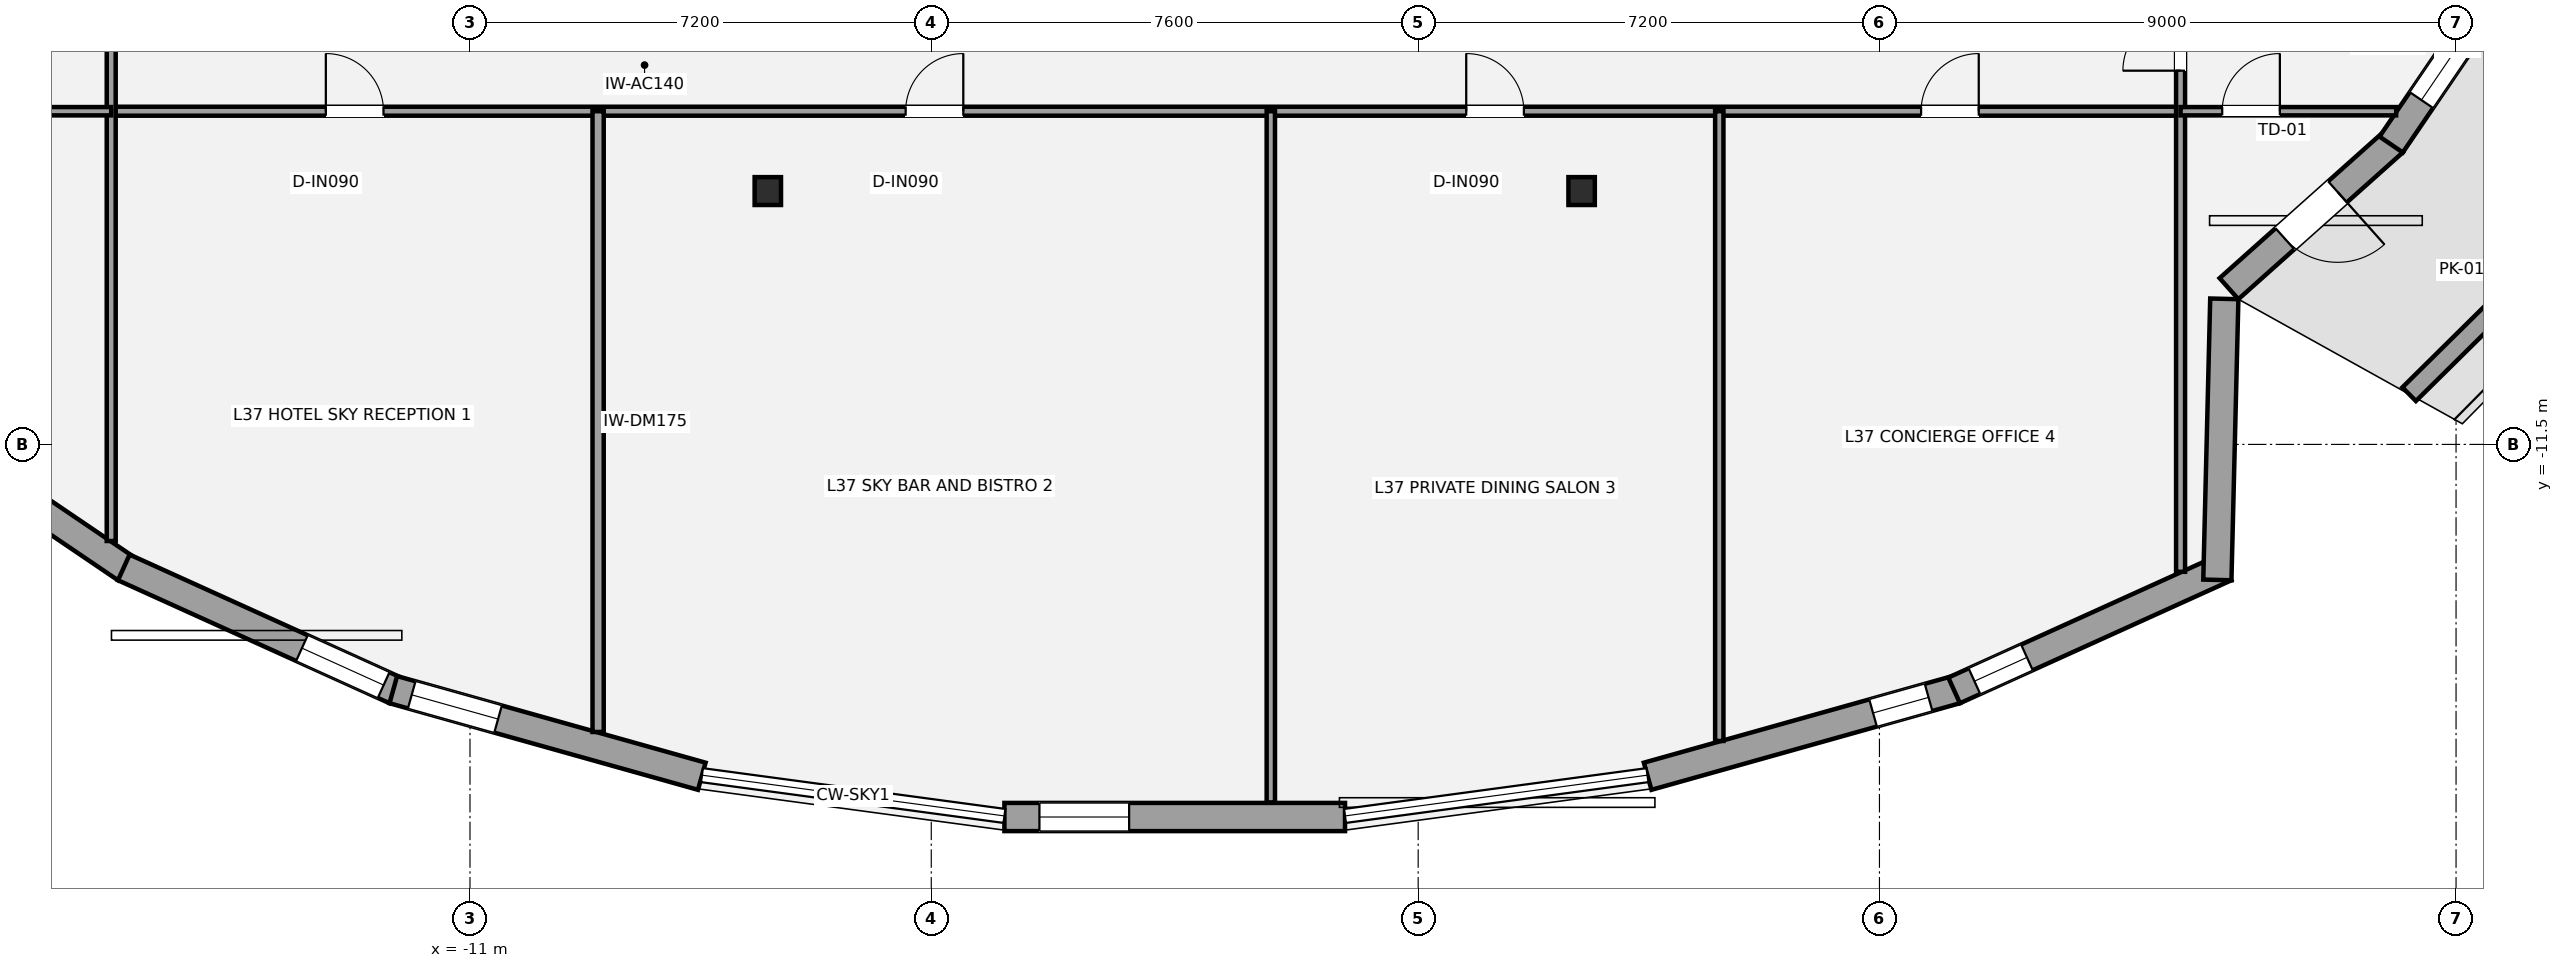
"""IFC4 building model, lengths in metres.
Left out: names, types, materials, properties, quantities, classifications, styles, units other than length and angle.
Written with IfcOpenShell. Run it as: python <this file> out.ifc"""

import sys

from ifc_helpers import new_model, si_unit, direction, frame, frame_2d, origin, origin_2d, place, context, subcontext, project, spatial, rectangle, i_section, extrude, element, fill, save


model = new_model("IFC4")
c1 = context("Model", 3, precision=1e-05, world=origin(), true_north=direction((0.0, 1.0)))
c2 = subcontext(c1, "Body", "Model", "MODEL_VIEW")
j1 = project(units=[si_unit("LENGTHUNIT", "METRE"), si_unit("PLANEANGLEUNIT", "RADIAN")], contexts=[c1])
p1 = place(None, origin())
s1 = spatial("IfcSite", under=j1, at=p1, CompositionType="ELEMENT")
p2 = place(p1, origin())
s2 = spatial("IfcBuilding", under=s1, at=p2, CompositionType="ELEMENT")
p3 = place(p2, frame((0.0, 0.0, 139.6)))
s3 = spatial("IfcBuildingStorey", under=s2, at=p3, CompositionType="ELEMENT", Elevation=139.6)
for number, where, z_axis, x_axis in (
    (1, (-6.351, -7.546, 0.0), (0.0, 0.0, 1.0), (1.0, 0.0, 0.0)),
    (2, (6.351, -7.546, 0.0), (0.0, 0.0, 1.0), (1.0, 0.0, 0.0)),
):
    element("IfcColumn", number, at=place(p3, frame(where, z_axis=z_axis, x_axis=x_axis)), inside=s3, PredefinedType="COLUMN", context=c2, shape_type="SweptSolid", body=[
        extrude(i_section(OverallWidth=0.412, OverallDepth=0.435, WebThickness=0.036, FlangeThickness=0.057, at=origin_2d()), origin(), (0.0, 0.0, 1.0), 4.2),
    ])
p4 = place(p3, frame((-16.371, -13.438, 0.0), z_axis=(0.0, 0.0, 1.0), x_axis=(-0.827816201219, 0.56099940909, 0.0)))
e3 = element("IfcWall", 3, at=p4, inside=s3, PredefinedType="STANDARD", context=c2, shape_type="SweptSolid", body=[
    extrude(rectangle(XDim=4.354, YDim=0.44, at=frame_2d((2.177, 0.0))), origin(), (0.0, 0.0, 1.0), 3.242),
])
p5 = place(p4, frame((2.958, 0.0, 0.58)))
e4 = element("IfcOpeningElement", 4, at=p5, cuts=e3, PredefinedType="OPENING", context=c2, shape_type="SweptSolid", body=[
    extrude(rectangle(XDim=0.9, YDim=1.35, at=frame_2d((0.45, 0.675))), frame((0.0, 0.23, 0.0), z_axis=(0.0, -1.0, 0.0), x_axis=(1.0, 0.0, 0.0)), (0.0, 0.0, 1.0), 0.46),
])
p6 = place(p3, frame((-12.166, -15.339, 0.0), z_axis=(0.0, 0.0, 1.0), x_axis=(-0.910938924115, 0.412541242221, 0.0)))
e5 = element("IfcWall", 5, at=p6, inside=s3, PredefinedType="STANDARD", context=c2, shape_type="SweptSolid", body=[
    extrude(rectangle(XDim=4.652, YDim=0.44, at=frame_2d((2.326, 0.0))), origin(), (0.0, 0.0, 1.0), 3.238),
])
p7 = place(p6, frame((0.2, 0.0, 0.58)))
e6 = element("IfcOpeningElement", 6, at=p7, cuts=e5, PredefinedType="OPENING", context=c2, shape_type="SweptSolid", body=[
    extrude(rectangle(XDim=1.4, YDim=1.55, at=frame_2d((0.7, 0.775))), frame((0.0, 0.23, 0.0), z_axis=(0.0, -1.0, 0.0), x_axis=(1.0, 0.0, 0.0)), (0.0, 0.0, 1.0), 0.46),
])
p8 = place(p3, frame((-7.382, -16.679, 0.0), z_axis=(0.0, 0.0, 1.0), x_axis=(-0.962784823987, 0.270269093129, 0.0)))
e7 = element("IfcWall", 7, at=p8, inside=s3, PredefinedType="STANDARD", context=c2, shape_type="SweptSolid", body=[
    extrude(rectangle(XDim=5.001, YDim=0.44, at=frame_2d((2.5, 0.0))), origin(), (0.0, 0.0, 1.0), 3.238),
])
p9 = place(p8, frame((3.302, 0.0, 0.58)))
e8 = element("IfcOpeningElement", 8, at=p9, cuts=e7, PredefinedType="OPENING", context=c2, shape_type="SweptSolid", body=[
    extrude(rectangle(XDim=1.4, YDim=1.55, at=frame_2d((0.7, 0.775))), frame((0.0, 0.23, 0.0), z_axis=(0.0, -1.0, 0.0), x_axis=(1.0, 0.0, 0.0)), (0.0, 0.0, 1.0), 0.46),
])
p10 = place(p3, frame((2.658, -17.315, 0.0), z_axis=(0.0, 0.0, 1.0), x_axis=(-1.0, 0.0, 0.0)))
e9 = element("IfcWall", 9, at=p10, inside=s3, PredefinedType="STANDARD", context=c2, shape_type="SweptSolid", body=[
    extrude(rectangle(XDim=5.317, YDim=0.44, at=frame_2d((2.658, 0.0))), origin(), (0.0, 0.0, 1.0), 3.242),
])
p11 = place(p10, frame((3.37, 0.0, 0.58)))
e10 = element("IfcOpeningElement", 10, at=p11, cuts=e9, PredefinedType="OPENING", context=c2, shape_type="SweptSolid", body=[
    extrude(rectangle(XDim=1.4, YDim=1.55, at=frame_2d((0.7, 0.775))), frame((0.0, 0.23, 0.0), z_axis=(0.0, -1.0, 0.0), x_axis=(1.0, 0.0, 0.0)), (0.0, 0.0, 1.0), 0.46),
])
p12 = place(p3, frame((12.197, -15.328, 0.0), z_axis=(0.0, 0.0, 1.0), x_axis=(-0.962784823987, -0.270269093129, 0.0)))
e11 = element("IfcWall", 11, at=p12, inside=s3, PredefinedType="STANDARD", context=c2, shape_type="SweptSolid", body=[
    extrude(rectangle(XDim=5.001, YDim=0.44, at=frame_2d((2.5, 0.0))), origin(), (0.0, 0.0, 1.0), 3.238),
])
p13 = place(p12, frame((0.447, 0.0, 0.58)))
e12 = element("IfcOpeningElement", 12, at=p13, cuts=e11, PredefinedType="OPENING", context=c2, shape_type="SweptSolid", body=[
    extrude(rectangle(XDim=0.9, YDim=1.35, at=frame_2d((0.45, 0.675))), frame((0.0, 0.23, 0.0), z_axis=(0.0, -1.0, 0.0), x_axis=(1.0, 0.0, 0.0)), (0.0, 0.0, 1.0), 0.46),
])
p14 = place(p3, frame((16.403, -13.42, 0.0), z_axis=(0.0, 0.0, 1.0), x_axis=(-0.910938924115, -0.412541242221, 0.0)))
e13 = element("IfcWall", 13, at=p14, inside=s3, PredefinedType="STANDARD", context=c2, shape_type="SweptSolid", body=[
    extrude(rectangle(XDim=4.652, YDim=0.44, at=frame_2d((2.326, 0.0))), origin(), (0.0, 0.0, 1.0), 3.238),
])
p15 = place(p14, frame((3.404, 0.0, 0.58)))
e14 = element("IfcOpeningElement", 14, at=p15, cuts=e13, PredefinedType="OPENING", context=c2, shape_type="SweptSolid", body=[
    extrude(rectangle(XDim=0.9, YDim=1.35, at=frame_2d((0.45, 0.675))), frame((0.0, 0.23, 0.0), z_axis=(0.0, -1.0, 0.0), x_axis=(1.0, 0.0, 0.0)), (0.0, 0.0, 1.0), 0.46),
])
p16 = place(p3, frame((16.383, -9.229, 0.0), z_axis=(0.0, 0.0, 1.0), x_axis=(-0.02470442983, -0.999694799, 0.0)))
e15 = element("IfcWall", 15, at=p16, inside=s3, PredefinedType="STANDARD", context=c2, shape_type="SweptSolid", body=[
    extrude(rectangle(XDim=4.388, YDim=0.44, at=frame_2d((2.194, 0.0))), origin(), (0.0, 0.0, 1.0), 3.242),
])
p17 = place(p3, frame((19.023, -6.78, 0.0), z_axis=(0.0, 0.0, 1.0), x_axis=(-0.746170592537, -0.665754794825, 0.0)))
e16 = element("IfcWall", 16, at=p17, inside=s3, PredefinedType="STANDARD", context=c2, shape_type="SweptSolid", body=[
    extrude(rectangle(XDim=3.44, YDim=0.44, at=frame_2d((1.72, 0.0))), origin(), (0.0, 0.0, 1.0), 3.242),
])
p18 = place(p17, frame((1.17, 0.0, 0.0)))
e17 = element("IfcOpeningElement", 17, at=p18, cuts=e16, PredefinedType="OPENING", context=c2, shape_type="SweptSolid", body=[
    extrude(rectangle(XDim=1.1, YDim=2.15, at=frame_2d((0.55, 1.075))), frame((0.0, 0.23, 0.0), z_axis=(0.0, -1.0, 0.0), x_axis=(1.0, 0.0, 0.0)), (0.0, 0.0, 1.0), 0.46),
])
p19 = place(p3, frame((20.781, -4.186, 0.0), z_axis=(0.0, 0.0, 1.0), x_axis=(-0.562718580525, -0.826648534222, 0.0)))
e18 = element("IfcWall", 18, at=p19, inside=s3, PredefinedType="STANDARD", context=c2, shape_type="SweptSolid", body=[
    extrude(rectangle(XDim=3.187, YDim=0.44, at=frame_2d((1.593, 0.0))), origin(), (0.0, 0.0, 1.0), 3.242),
])
p20 = place(p19, frame((0.347, 0.0, 0.6)))
e19 = element("IfcOpeningElement", 19, at=p20, cuts=e18, PredefinedType="OPENING", context=c2, shape_type="SweptSolid", body=[
    extrude(rectangle(XDim=2.0, YDim=2.1, at=frame_2d((1.0, 1.05))), frame((0.0, 0.23, 0.0), z_axis=(0.0, -1.0, 0.0), x_axis=(1.0, 0.0, 0.0)), (0.0, 0.0, 1.0), 0.46),
])
p21 = place(p3, frame((19.268, -10.716, 0.0), z_axis=(0.0, 0.0, 1.0), x_axis=(0.711578739804, 0.702606359962, 0.0)))
e20 = element("IfcWall", 20, at=p21, inside=s3, PredefinedType="PARAPET", context=c2, shape_type="SweptSolid", body=[
    extrude(rectangle(XDim=3.891, YDim=0.3, at=frame_2d((1.946, 0.0))), origin(), (0.0, 0.0, 1.0), 0.45),
])
p22 = place(p3, frame((-16.6, -6.3, 0.0), z_axis=(0.0, 0.0, 1.0), x_axis=(1.0, 0.0, 0.0)))
e21 = element("IfcWall", 21, at=p22, inside=s3, PredefinedType="PARTITIONING", context=c2, shape_type="SweptSolid", body=[
    extrude(rectangle(XDim=32.3, YDim=0.14, at=frame_2d((16.15, 0.0))), origin(), (0.0, 0.0, 1.0), 3.398),
])
p23 = place(p22, frame((3.35, 0.0, 0.0)))
e22 = element("IfcOpeningElement", 22, at=p23, cuts=e21, PredefinedType="OPENING", context=c2, shape_type="SweptSolid", body=[
    extrude(rectangle(XDim=0.9, YDim=2.1, at=frame_2d((0.45, 1.05))), frame((0.0, 0.08, 0.0), z_axis=(0.0, -1.0, 0.0), x_axis=(1.0, 0.0, 0.0)), (0.0, 0.0, 1.0), 0.16),
])
p24 = place(p22, frame((12.4, 0.0, 0.0)))
e23 = element("IfcOpeningElement", 23, at=p24, cuts=e21, PredefinedType="OPENING", context=c2, shape_type="SweptSolid", body=[
    extrude(rectangle(XDim=0.9, YDim=2.1, at=frame_2d((0.45, 1.05))), frame((0.0, 0.08, 0.0), z_axis=(0.0, -1.0, 0.0), x_axis=(1.0, 0.0, 0.0)), (0.0, 0.0, 1.0), 0.16),
])
p25 = place(p22, frame((21.15, 0.0, 0.0)))
e24 = element("IfcOpeningElement", 24, at=p25, cuts=e21, PredefinedType="OPENING", context=c2, shape_type="SweptSolid", body=[
    extrude(rectangle(XDim=0.9, YDim=2.1, at=frame_2d((0.45, 1.05))), frame((0.0, 0.08, 0.0), z_axis=(0.0, -1.0, 0.0), x_axis=(1.0, 0.0, 0.0)), (0.0, 0.0, 1.0), 0.16),
])
p26 = place(p22, frame((28.25, 0.0, 0.0)))
e25 = element("IfcOpeningElement", 25, at=p26, cuts=e21, PredefinedType="OPENING", context=c2, shape_type="SweptSolid", body=[
    extrude(rectangle(XDim=0.9, YDim=2.1, at=frame_2d((0.45, 1.05))), frame((0.0, 0.08, 0.0), z_axis=(0.0, -1.0, 0.0), x_axis=(1.0, 0.0, 0.0)), (0.0, 0.0, 1.0), 0.16),
])
p27 = place(p3, frame((-16.6, -13.008, 0.0), z_axis=(0.0, 0.0, 1.0), x_axis=(0.0, 1.0, 0.0)))
e26 = element("IfcWall", 26, at=p27, inside=s3, PredefinedType="PARTITIONING", context=c2, shape_type="SweptSolid", body=[
    extrude(rectangle(XDim=20.558, YDim=0.14, at=frame_2d((10.279, 0.0))), origin(), (0.0, 0.0, 1.0), 3.398),
])
p28 = place(p27, frame((10.508, 0.0, 0.0)))
e27 = element("IfcOpeningElement", 27, at=p28, cuts=e26, PredefinedType="OPENING", context=c2, shape_type="SweptSolid", body=[
    extrude(rectangle(XDim=0.9, YDim=2.1, at=frame_2d((0.45, 1.05))), frame((0.0, 0.08, 0.0), z_axis=(0.0, -1.0, 0.0), x_axis=(1.0, 0.0, 0.0)), (0.0, 0.0, 1.0), 0.16),
])
p29 = place(p27, frame((17.433, 0.0, 0.0)))
e28 = element("IfcOpeningElement", 28, at=p29, cuts=e26, PredefinedType="OPENING", context=c2, shape_type="SweptSolid", body=[
    extrude(rectangle(XDim=0.9, YDim=2.1, at=frame_2d((0.45, 1.05))), frame((0.0, 0.08, 0.0), z_axis=(0.0, -1.0, 0.0), x_axis=(1.0, 0.0, 0.0)), (0.0, 0.0, 1.0), 0.16),
])
p30 = place(p3, frame((15.7, -13.488, 0.0), z_axis=(0.0, 0.0, 1.0), x_axis=(0.0, 1.0, 0.0)))
e29 = element("IfcWall", 29, at=p30, inside=s3, PredefinedType="PARTITIONING", context=c2, shape_type="SweptSolid", body=[
    extrude(rectangle(XDim=21.038, YDim=0.14, at=frame_2d((10.519, 0.0))), origin(), (0.0, 0.0, 1.0), 3.473),
])
p31 = place(p30, frame((7.821, 0.0, 0.0)))
e30 = element("IfcOpeningElement", 30, at=p31, cuts=e29, PredefinedType="OPENING", context=c2, shape_type="SweptSolid", body=[
    extrude(rectangle(XDim=0.9, YDim=2.1, at=frame_2d((0.45, 1.05))), frame((0.0, 0.08, 0.0), z_axis=(0.0, -1.0, 0.0), x_axis=(1.0, 0.0, 0.0)), (0.0, 0.0, 1.0), 0.16),
])
p32 = place(p30, frame((10.153, 0.0, 0.0)))
e31 = element("IfcOpeningElement", 31, at=p32, cuts=e29, PredefinedType="OPENING", context=c2, shape_type="SweptSolid", body=[
    extrude(rectangle(XDim=0.9, YDim=2.1, at=frame_2d((0.45, 1.05))), frame((0.0, 0.08, 0.0), z_axis=(0.0, -1.0, 0.0), x_axis=(1.0, 0.0, 0.0)), (0.0, 0.0, 1.0), 0.16),
])
p33 = place(p30, frame((13.921, 0.0, 0.0)))
e32 = element("IfcOpeningElement", 32, at=p33, cuts=e29, PredefinedType="OPENING", context=c2, shape_type="SweptSolid", body=[
    extrude(rectangle(XDim=0.9, YDim=2.1, at=frame_2d((0.45, 1.05))), frame((0.0, 0.08, 0.0), z_axis=(0.0, -1.0, 0.0), x_axis=(1.0, 0.0, 0.0)), (0.0, 0.0, 1.0), 0.16),
])
p34 = place(p30, frame((18.513, 0.0, 0.0)))
e33 = element("IfcOpeningElement", 33, at=p34, cuts=e29, PredefinedType="OPENING", context=c2, shape_type="SweptSolid", body=[
    extrude(rectangle(XDim=0.9, YDim=2.1, at=frame_2d((0.45, 1.05))), frame((0.0, 0.08, 0.0), z_axis=(0.0, -1.0, 0.0), x_axis=(1.0, 0.0, 0.0)), (0.0, 0.0, 1.0), 0.16),
])
p35 = place(p3, frame((-9.0, -15.988, 0.0), z_axis=(0.0, 0.0, 1.0), x_axis=(0.0, 1.0, 0.0)))
e34 = element("IfcWall", 34, at=p35, inside=s3, PredefinedType="PARTITIONING", context=c2, shape_type="SweptSolid", body=[
    extrude(rectangle(XDim=9.688, YDim=0.175, at=frame_2d((4.844, 0.0))), origin(), (0.0, 0.0, 1.0), 4.02),
])
p36 = place(p3, frame((1.5, -17.087, 0.0), z_axis=(0.0, 0.0, 1.0), x_axis=(0.0, 1.0, 0.0)))
e35 = element("IfcWall", 35, at=p36, inside=s3, PredefinedType="PARTITIONING", context=c2, shape_type="SweptSolid", body=[
    extrude(rectangle(XDim=10.787, YDim=0.13, at=frame_2d((5.394, 0.0))), origin(), (0.0, 0.0, 1.0), 3.473),
])
p37 = place(p3, frame((8.5, -16.129, 0.0), z_axis=(0.0, 0.0, 1.0), x_axis=(0.0, 1.0, 0.0)))
e36 = element("IfcWall", 36, at=p37, inside=s3, PredefinedType="PARTITIONING", context=c2, shape_type="SweptSolid", body=[
    extrude(rectangle(XDim=9.829, YDim=0.13, at=frame_2d((4.914, 0.0))), origin(), (0.0, 0.0, 1.0), 4.02),
])
p38 = place(p3, frame((-23.631, -6.3, 0.0), z_axis=(0.0, 0.0, 1.0), x_axis=(1.0, 0.0, 0.0)))
e37 = element("IfcWall", 37, at=p38, inside=s3, PredefinedType="PARTITIONING", context=c2, shape_type="SweptSolid", body=[
    extrude(rectangle(XDim=7.031, YDim=0.13, at=frame_2d((3.516, 0.0))), origin(), (0.0, 0.0, 1.0), 3.473),
])
p39 = place(p38, frame((1.23, 0.0, 0.0)))
e38 = element("IfcOpeningElement", 38, at=p39, cuts=e37, PredefinedType="OPENING", context=c2, shape_type="SweptSolid", body=[
    extrude(rectangle(XDim=0.9, YDim=2.1, at=frame_2d((0.45, 1.05))), frame((0.0, 0.075, 0.0), z_axis=(0.0, -1.0, 0.0), x_axis=(1.0, 0.0, 0.0)), (0.0, 0.0, 1.0), 0.15),
])
p40 = place(p3, frame((15.7, -6.3, 0.0), z_axis=(0.0, 0.0, 1.0), x_axis=(1.0, 0.0, 0.0)))
e39 = element("IfcWall", 39, at=p40, inside=s3, PredefinedType="PARTITIONING", context=c2, shape_type="SweptSolid", body=[
    extrude(rectangle(XDim=3.365, YDim=0.13, at=frame_2d((1.683, 0.0))), origin(), (0.0, 0.0, 1.0), 4.02),
])
p41 = place(p40, frame((0.65, 0.0, 0.0)))
e40 = element("IfcOpeningElement", 40, at=p41, cuts=e39, PredefinedType="OPENING", context=c2, shape_type="SweptSolid", body=[
    extrude(rectangle(XDim=0.9, YDim=2.1, at=frame_2d((0.45, 1.05))), frame((0.0, 0.075, 0.0), z_axis=(0.0, -1.0, 0.0), x_axis=(1.0, 0.0, 0.0)), (0.0, 0.0, 1.0), 0.15),
])
p42 = place(p7, origin())
e41 = element("IfcWindow", 41, at=p42, inside=s3, PartitioningType="SINGLE_PANEL", PredefinedType="WINDOW", context=c2, shape_type="SweptSolid", body=[
    extrude(rectangle(XDim=1.4, YDim=1.55, at=frame_2d((0.7, 0.775))), frame((0.0, -0.01, 0.0), z_axis=(0.0, -1.0, 0.0), x_axis=(1.0, 0.0, 0.0)), (0.0, 0.0, 1.0), 0.06),
])
fill(e6, e41)
p43 = place(p9, origin())
e42 = element("IfcWindow", 42, at=p43, inside=s3, PartitioningType="SINGLE_PANEL", PredefinedType="WINDOW", context=c2, shape_type="SweptSolid", body=[
    extrude(rectangle(XDim=1.4, YDim=1.55, at=frame_2d((0.7, 0.775))), frame((0.0, -0.01, 0.0), z_axis=(0.0, -1.0, 0.0), x_axis=(1.0, 0.0, 0.0)), (0.0, 0.0, 1.0), 0.06),
])
fill(e8, e42)
p44 = place(p11, origin())
e43 = element("IfcWindow", 43, at=p44, inside=s3, PartitioningType="SINGLE_PANEL", PredefinedType="WINDOW", context=c2, shape_type="SweptSolid", body=[
    extrude(rectangle(XDim=1.4, YDim=1.55, at=frame_2d((0.7, 0.775))), frame((0.0, -0.01, 0.0), z_axis=(0.0, -1.0, 0.0), x_axis=(1.0, 0.0, 0.0)), (0.0, 0.0, 1.0), 0.06),
])
fill(e10, e43)
p45 = place(p13, origin())
e44 = element("IfcWindow", 44, at=p45, inside=s3, PartitioningType="SINGLE_PANEL", PredefinedType="WINDOW", context=c2, shape_type="SweptSolid", body=[
    extrude(rectangle(XDim=0.9, YDim=1.35, at=frame_2d((0.45, 0.675))), frame((0.0, -0.01, 0.0), z_axis=(0.0, -1.0, 0.0), x_axis=(1.0, 0.0, 0.0)), (0.0, 0.0, 1.0), 0.06),
])
fill(e12, e44)
p46 = place(p15, origin())
e45 = element("IfcWindow", 45, at=p46, inside=s3, PartitioningType="SINGLE_PANEL", PredefinedType="WINDOW", context=c2, shape_type="SweptSolid", body=[
    extrude(rectangle(XDim=0.9, YDim=1.35, at=frame_2d((0.45, 0.675))), frame((0.0, -0.01, 0.0), z_axis=(0.0, -1.0, 0.0), x_axis=(1.0, 0.0, 0.0)), (0.0, 0.0, 1.0), 0.06),
])
fill(e14, e45)
p47 = place(p18, origin())
e46 = element("IfcDoor", 46, at=p47, inside=s3, OperationType="SINGLE_SWING_LEFT", PredefinedType="DOOR", context=c2, shape_type="SweptSolid", body=[
    extrude(rectangle(XDim=1.1, YDim=2.15, at=frame_2d((0.55, 1.075))), frame((0.0, 0.025, 0.0), z_axis=(0.0, -1.0, 0.0), x_axis=(1.0, 0.0, 0.0)), (0.0, 0.0, 1.0), 0.05),
])
fill(e17, e46)
p48 = place(p20, origin())
e47 = element("IfcWindow", 47, at=p48, inside=s3, PartitioningType="SINGLE_PANEL", PredefinedType="WINDOW", context=c2, shape_type="SweptSolid", body=[
    extrude(rectangle(XDim=2.0, YDim=2.1, at=frame_2d((1.0, 1.05))), frame((0.0, -0.01, 0.0), z_axis=(0.0, -1.0, 0.0), x_axis=(1.0, 0.0, 0.0)), (0.0, 0.0, 1.0), 0.06),
])
fill(e19, e47)
p49 = place(p23, origin())
e48 = element("IfcDoor", 48, at=p49, inside=s3, OperationType="SINGLE_SWING_LEFT", PredefinedType="DOOR", context=c2, shape_type="SweptSolid", body=[
    extrude(rectangle(XDim=0.9, YDim=2.1, at=frame_2d((0.45, 1.05))), frame((0.0, 0.025, 0.0), z_axis=(0.0, -1.0, 0.0), x_axis=(1.0, 0.0, 0.0)), (0.0, 0.0, 1.0), 0.05),
])
fill(e22, e48)
p50 = place(p24, origin())
e49 = element("IfcDoor", 49, at=p50, inside=s3, OperationType="SINGLE_SWING_RIGHT", PredefinedType="DOOR", context=c2, shape_type="SweptSolid", body=[
    extrude(rectangle(XDim=0.9, YDim=2.1, at=frame_2d((0.45, 1.05))), frame((0.0, 0.025, 0.0), z_axis=(0.0, -1.0, 0.0), x_axis=(1.0, 0.0, 0.0)), (0.0, 0.0, 1.0), 0.05),
])
fill(e23, e49)
p51 = place(p25, origin())
e50 = element("IfcDoor", 50, at=p51, inside=s3, OperationType="SINGLE_SWING_LEFT", PredefinedType="DOOR", context=c2, shape_type="SweptSolid", body=[
    extrude(rectangle(XDim=0.9, YDim=2.1, at=frame_2d((0.45, 1.05))), frame((0.0, 0.025, 0.0), z_axis=(0.0, -1.0, 0.0), x_axis=(1.0, 0.0, 0.0)), (0.0, 0.0, 1.0), 0.05),
])
fill(e24, e50)
p52 = place(p26, origin())
e51 = element("IfcDoor", 51, at=p52, inside=s3, OperationType="SINGLE_SWING_RIGHT", PredefinedType="DOOR", context=c2, shape_type="SweptSolid", body=[
    extrude(rectangle(XDim=0.9, YDim=2.1, at=frame_2d((0.45, 1.05))), frame((0.0, 0.025, 0.0), z_axis=(0.0, -1.0, 0.0), x_axis=(1.0, 0.0, 0.0)), (0.0, 0.0, 1.0), 0.05),
])
fill(e25, e51)
p53 = place(p41, origin())
e52 = element("IfcDoor", 52, at=p53, inside=s3, OperationType="SINGLE_SWING_RIGHT", PredefinedType="DOOR", context=c2, shape_type="SweptSolid", body=[
    extrude(rectangle(XDim=0.9, YDim=2.1, at=frame_2d((0.45, 1.05))), frame((0.0, 0.025, 0.0), z_axis=(0.0, -1.0, 0.0), x_axis=(1.0, 0.0, 0.0)), (0.0, 0.0, 1.0), 0.05),
])
fill(e40, e52)
p54 = place(p31, origin())
e53 = element("IfcDoor", 53, at=p54, inside=s3, OperationType="SINGLE_SWING_LEFT", PredefinedType="DOOR", context=c2, shape_type="SweptSolid", body=[
    extrude(rectangle(XDim=0.9, YDim=2.1, at=frame_2d((0.45, 1.05))), frame((0.0, 0.025, 0.0), z_axis=(0.0, -1.0, 0.0), x_axis=(1.0, 0.0, 0.0)), (0.0, 0.0, 1.0), 0.05),
])
fill(e30, e53)
save(model, sys.argv[1])
